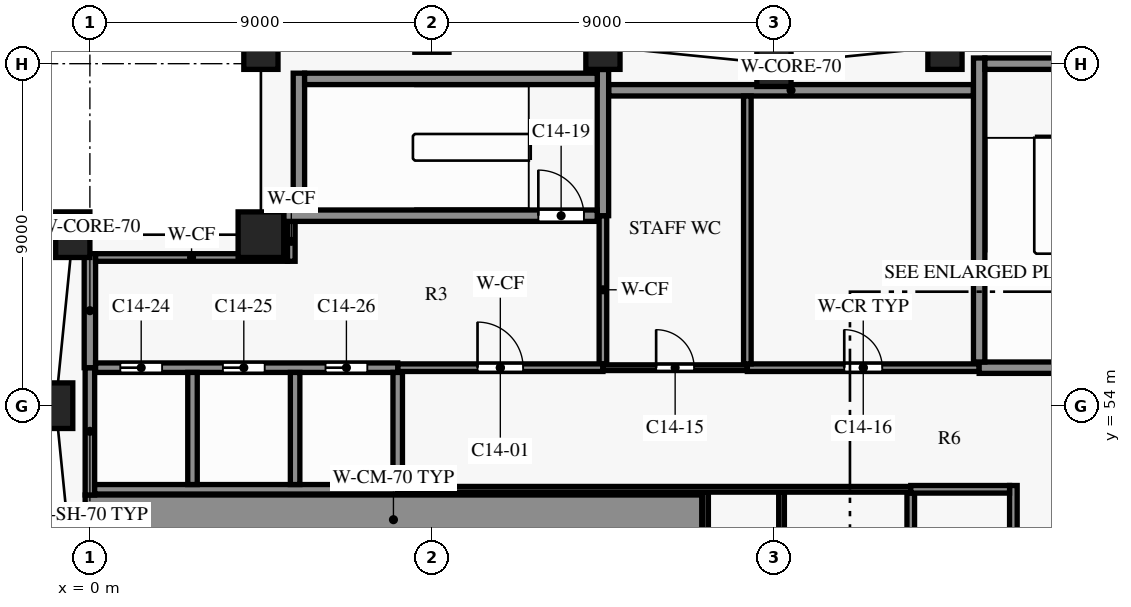
"""IFC4 building model, lengths in metres.
Left out: names, types, materials, properties, quantities, classifications, styles, units other than length and angle.
Written with IfcOpenShell. Run it as: python <this file> out.ifc"""

import sys

from ifc_helpers import new_model, si_unit, direction, frame, frame_2d, origin, origin_2d, place, context, subcontext, project, spatial, rectangle, extrude, element, fill, save


model = new_model("IFC4")
c1 = context("Model", 3, precision=1e-05, world=origin(), true_north=direction((0.0, 1.0)))
c2 = subcontext(c1, "Body", "Model", "MODEL_VIEW")
j1 = project(units=[si_unit("LENGTHUNIT", "METRE"), si_unit("PLANEANGLEUNIT", "RADIAN")], contexts=[c1])
p1 = place(None, origin())
s1 = spatial("IfcSite", under=j1, at=p1, CompositionType="ELEMENT")
p2 = place(p1, origin())
s2 = spatial("IfcBuilding", under=s1, at=p2, CompositionType="ELEMENT")
p3 = place(p2, frame((0.0, 0.0, 96.1)))
s3 = spatial("IfcBuildingStorey", under=s2, at=p3, CompositionType="ELEMENT", Elevation=96.1)
for number, where, z_axis, x_axis in (
    (1, (22.5, 63.45, 0.0), (0.0, 0.0, 1.0), (-0.995, -0.1, 0.0)),
    (2, (18.0, 63.0, 0.0), (0.0, 0.0, 1.0), (-1.0, 0.0, 0.0)),
    (3, (13.5, 63.45, 0.0), (0.0, 0.0, 1.0), (-0.995, 0.1, 0.0)),
    (4, (9.0, 63.9, 0.0), (0.0, 0.0, 1.0), (-1.0, 0.0, 0.0)),
    (5, (4.5, 63.45, 0.0), (0.0, 0.0, 1.0), (-0.995, -0.1, 0.0)),
    (6, (-0.45, 58.5, 0.0), (0.0, 0.0, 1.0), (-0.1, -0.995, 0.0)),
    (7, (-0.9, 54.0, 0.0), (0.0, 0.0, 1.0), (0.0, -1.0, 0.0)),
):
    element("IfcColumn", number, at=place(p3, frame(where, z_axis=z_axis, x_axis=x_axis)), inside=s3, PredefinedType="COLUMN", context=c2, shape_type="SweptSolid", body=[
        extrude(rectangle(XDim=0.9, YDim=1.2, at=origin_2d()), origin(), (0.0, 0.0, 1.0), 3.8),
    ])
p4 = place(p3, frame((4.5, 58.5, 0.0), z_axis=(0.0, 0.0, 1.0), x_axis=(1.0, 0.0, 0.0)))
e8 = element("IfcColumn", 8, at=p4, inside=s3, PredefinedType="COLUMN", context=c2, shape_type="SweptSolid", body=[
    extrude(rectangle(XDim=1.2, YDim=1.2, at=origin_2d()), origin(), (0.0, 0.0, 1.0), 3.8),
])
p5 = place(p3, frame((-0.125, 51.0, 0.0), z_axis=(0.0, 0.0, 1.0), x_axis=(1.0, 0.0, 0.0)))
e9 = element("IfcWall", 9, at=p5, inside=s3, PredefinedType="SHEAR", context=c2, shape_type="SweptSolid", body=[
    extrude(rectangle(XDim=16.225, YDim=1.3, at=frame_2d((8.113, 0.0))), origin(), (0.0, 0.0, 1.0), 3.5),
])
p6 = place(p3, frame((8.1, 51.8, 0.0), z_axis=(0.0, 0.0, 1.0), x_axis=(1.0, 0.0, 0.0)))
e10 = element("IfcWall", 10, at=p6, inside=s3, PredefinedType="PARTITIONING", context=c2, shape_type="SweptSolid", body=[
    extrude(rectangle(XDim=13.5, YDim=0.15, at=frame_2d((6.75, 0.0))), origin(), (0.0, 0.0, 1.0), 3.5),
])
p7 = place(p3, frame((21.6, 51.8, 0.0), z_axis=(0.0, 0.0, 1.0), x_axis=(1.0, 0.0, 0.0)))
e11 = element("IfcWall", 11, at=p7, inside=s3, PredefinedType="PARTITIONING", context=c2, shape_type="SweptSolid", body=[
    extrude(rectangle(XDim=2.6, YDim=0.2, at=frame_2d((1.3, 0.0))), origin(), (0.0, 0.0, 1.0), 3.5),
])
p8 = place(p3, frame((0.125, 51.8, 0.0), z_axis=(0.0, 0.0, 1.0), x_axis=(1.0, 0.0, 0.0)))
e12 = element("IfcWall", 12, at=p8, inside=s3, PredefinedType="SHEAR", context=c2, shape_type="SweptSolid", body=[
    extrude(rectangle(XDim=7.975, YDim=0.25, at=frame_2d((3.988, 0.0))), origin(), (0.0, 0.0, 1.0), 3.5),
])
p9 = place(p3, frame((8.1, 55.0, 0.0), z_axis=(0.0, 0.0, 1.0), x_axis=(1.0, 0.0, 0.0)))
e13 = element("IfcWall", 13, at=p9, inside=s3, PredefinedType="PARTITIONING", context=c2, shape_type="SweptSolid", body=[
    extrude(rectangle(XDim=5.4, YDim=0.2, at=frame_2d((2.7, 0.0))), origin(), (0.0, 0.0, 1.0), 3.5),
])
p10 = place(p9, frame((2.1, 0.0, 0.0)))
e14 = element("IfcOpeningElement", 14, at=p10, cuts=e13, PredefinedType="OPENING", context=c2, shape_type="SweptSolid", body=[
    extrude(rectangle(XDim=1.2, YDim=2.2, at=frame_2d((0.6, 1.1))), frame((0.0, 0.11, 0.0), z_axis=(0.0, -1.0, 0.0), x_axis=(1.0, 0.0, 0.0)), (0.0, 0.0, 1.0), 0.22),
])
p11 = place(p3, frame((13.5, 55.0, 0.0), z_axis=(0.0, 0.0, 1.0), x_axis=(1.0, 0.0, 0.0)))
e15 = element("IfcWall", 15, at=p11, inside=s3, PredefinedType="PARTITIONING", context=c2, shape_type="SweptSolid", body=[
    extrude(rectangle(XDim=3.8, YDim=0.15, at=frame_2d((1.9, 0.0))), origin(), (0.0, 0.0, 1.0), 3.5),
])
p12 = place(p11, frame((1.4, 0.0, 0.0)))
e16 = element("IfcOpeningElement", 16, at=p12, cuts=e15, PredefinedType="OPENING", context=c2, shape_type="SweptSolid", body=[
    extrude(rectangle(XDim=1.0, YDim=2.1, at=frame_2d((0.5, 1.05))), frame((0.0, 0.085, 0.0), z_axis=(0.0, -1.0, 0.0), x_axis=(1.0, 0.0, 0.0)), (0.0, 0.0, 1.0), 0.17),
])
p13 = place(p3, frame((17.3, 55.0, 0.0), z_axis=(0.0, 0.0, 1.0), x_axis=(1.0, 0.0, 0.0)))
e17 = element("IfcWall", 17, at=p13, inside=s3, PredefinedType="PARTITIONING", context=c2, shape_type="SweptSolid", body=[
    extrude(rectangle(XDim=6.1, YDim=0.2, at=frame_2d((3.05, 0.0))), origin(), (0.0, 0.0, 1.0), 3.5),
])
p14 = place(p13, frame((2.55, 0.0, 0.0)))
e18 = element("IfcOpeningElement", 18, at=p14, cuts=e17, PredefinedType="OPENING", context=c2, shape_type="SweptSolid", body=[
    extrude(rectangle(XDim=1.0, YDim=2.1, at=frame_2d((0.5, 1.05))), frame((0.0, 0.11, 0.0), z_axis=(0.0, -1.0, 0.0), x_axis=(1.0, 0.0, 0.0)), (0.0, 0.0, 1.0), 0.22),
])
p15 = place(p3, frame((0.15, 55.0, 0.0), z_axis=(0.0, 0.0, 1.0), x_axis=(1.0, 0.0, 0.0)))
e19 = element("IfcWall", 19, at=p15, inside=s3, PredefinedType="SHEAR", context=c2, shape_type="SweptSolid", body=[
    extrude(rectangle(XDim=7.95, YDim=0.25, at=frame_2d((3.975, 0.0))), origin(), (0.0, 0.0, 1.0), 3.5),
])
p16 = place(p15, frame((0.65, 0.0, 0.0)))
e20 = element("IfcOpeningElement", 20, at=p16, cuts=e19, PredefinedType="OPENING", context=c2, shape_type="SweptSolid", body=[
    extrude(rectangle(XDim=1.1, YDim=2.1, at=frame_2d((0.55, 1.05))), frame((0.0, 0.135, 0.0), z_axis=(0.0, -1.0, 0.0), x_axis=(1.0, 0.0, 0.0)), (0.0, 0.0, 1.0), 0.27),
])
p17 = place(p15, frame((3.35, 0.0, 0.0)))
e21 = element("IfcOpeningElement", 21, at=p17, cuts=e19, PredefinedType="OPENING", context=c2, shape_type="SweptSolid", body=[
    extrude(rectangle(XDim=1.1, YDim=2.1, at=frame_2d((0.55, 1.05))), frame((0.0, 0.135, 0.0), z_axis=(0.0, -1.0, 0.0), x_axis=(1.0, 0.0, 0.0)), (0.0, 0.0, 1.0), 0.27),
])
p18 = place(p15, frame((6.05, 0.0, 0.0)))
e22 = element("IfcOpeningElement", 22, at=p18, cuts=e19, PredefinedType="OPENING", context=c2, shape_type="SweptSolid", body=[
    extrude(rectangle(XDim=1.1, YDim=2.1, at=frame_2d((0.55, 1.05))), frame((0.0, 0.135, 0.0), z_axis=(0.0, -1.0, 0.0), x_axis=(1.0, 0.0, 0.0)), (0.0, 0.0, 1.0), 0.27),
])
p19 = place(p3, frame((23.4, 55.0, 0.0), z_axis=(0.0, 0.0, 1.0), x_axis=(1.0, 0.0, 0.0)))
e23 = element("IfcWall", 23, at=p19, inside=s3, PredefinedType="SHEAR", context=c2, shape_type="SweptSolid", body=[
    extrude(rectangle(XDim=3.45, YDim=0.3, at=frame_2d((1.725, 0.0))), origin(), (0.0, 0.0, 1.0), 3.5),
])
p20 = place(p3, frame((0.15, 57.9, 0.0), z_axis=(0.0, 0.0, 1.0), x_axis=(1.0, 0.0, 0.0)))
e24 = element("IfcWall", 24, at=p20, inside=s3, PredefinedType="PARTITIONING", context=c2, shape_type="SweptSolid", body=[
    extrude(rectangle(XDim=5.05, YDim=0.2, at=frame_2d((2.525, 0.0))), origin(), (0.0, 0.0, 1.0), 3.5),
])
p21 = place(p3, frame((5.1, 59.0, 0.0), z_axis=(0.0, 0.0, 1.0), x_axis=(1.0, 0.0, 0.0)))
e25 = element("IfcWall", 25, at=p21, inside=s3, PredefinedType="SHEAR", context=c2, shape_type="SweptSolid", body=[
    extrude(rectangle(XDim=8.25, YDim=0.3, at=frame_2d((4.125, 0.0))), origin(), (0.0, 0.0, 1.0), 3.5),
])
p22 = place(p21, frame((6.7, 0.0, 0.0)))
e26 = element("IfcOpeningElement", 26, at=p22, cuts=e25, PredefinedType="OPENING", context=c2, shape_type="SweptSolid", body=[
    extrude(rectangle(XDim=1.2, YDim=2.2, at=frame_2d((0.6, 1.1))), frame((0.0, 0.16, 0.0), z_axis=(0.0, -1.0, 0.0), x_axis=(1.0, 0.0, 0.0)), (0.0, 0.0, 1.0), 0.32),
])
p23 = place(p3, frame((13.65, 62.3, 0.0), z_axis=(0.0, 0.0, 1.0), x_axis=(1.0, 0.0, 0.0)))
e27 = element("IfcWall", 27, at=p23, inside=s3, PredefinedType="SHEAR", context=c2, shape_type="SweptSolid", body=[
    extrude(rectangle(XDim=9.6, YDim=0.3, at=frame_2d((4.8, 0.0))), origin(), (0.0, 0.0, 1.0), 3.5),
])
p24 = place(p3, frame((5.65, 62.6, 0.0), z_axis=(0.0, 0.0, 1.0), x_axis=(1.0, 0.0, 0.0)))
e28 = element("IfcWall", 28, at=p24, inside=s3, PredefinedType="SHEAR", context=c2, shape_type="SweptSolid", body=[
    extrude(rectangle(XDim=7.7, YDim=0.3, at=frame_2d((3.85, 0.0))), origin(), (0.0, 0.0, 1.0), 3.5),
])
p25 = place(p3, frame((23.55, 63.0, 0.0), z_axis=(0.0, 0.0, 1.0), x_axis=(1.0, 0.0, 0.0)))
e29 = element("IfcWall", 29, at=p25, inside=s3, PredefinedType="SHEAR", context=c2, shape_type="SweptSolid", body=[
    extrude(rectangle(XDim=3.3, YDim=0.3, at=frame_2d((1.65, 0.0))), origin(), (0.0, 0.0, 1.0), 3.5),
])
p26 = place(p3, frame((0.0, 55.0, 0.0), z_axis=(0.0, 0.0, 1.0), x_axis=(0.0, 1.0, 0.0)))
e30 = element("IfcWall", 30, at=p26, inside=s3, PredefinedType="SHEAR", context=c2, shape_type="SweptSolid", body=[
    extrude(rectangle(XDim=3.0, YDim=0.3, at=frame_2d((1.5, 0.0))), origin(), (0.0, 0.0, 1.0), 3.5),
])
p27 = place(p3, frame((0.0, 51.65, 0.0), z_axis=(0.0, 0.0, 1.0), x_axis=(0.0, 1.0, 0.0)))
e31 = element("IfcWall", 31, at=p27, inside=s3, PredefinedType="SHEAR", context=c2, shape_type="SweptSolid", body=[
    extrude(rectangle(XDim=3.35, YDim=0.25, at=frame_2d((1.675, 0.0))), origin(), (0.0, 0.0, 1.0), 3.5),
])
p28 = place(p3, frame((2.7, 51.925, 0.0), z_axis=(0.0, 0.0, 1.0), x_axis=(0.0, 1.0, 0.0)))
e32 = element("IfcWall", 32, at=p28, inside=s3, PredefinedType="SHEAR", context=c2, shape_type="SweptSolid", body=[
    extrude(rectangle(XDim=2.95, YDim=0.25, at=frame_2d((1.475, 0.0))), origin(), (0.0, 0.0, 1.0), 3.5),
])
p29 = place(p3, frame((5.3, 57.8, 0.0), z_axis=(0.0, 0.0, 1.0), x_axis=(0.0, 1.0, 0.0)))
e33 = element("IfcWall", 33, at=p29, inside=s3, PredefinedType="PARTITIONING", context=c2, shape_type="SweptSolid", body=[
    extrude(rectangle(XDim=1.05, YDim=0.2, at=frame_2d((0.525, 0.0))), origin(), (0.0, 0.0, 1.0), 3.5),
])
p30 = place(p3, frame((5.4, 51.925, 0.0), z_axis=(0.0, 0.0, 1.0), x_axis=(0.0, 1.0, 0.0)))
e34 = element("IfcWall", 34, at=p30, inside=s3, PredefinedType="SHEAR", context=c2, shape_type="SweptSolid", body=[
    extrude(rectangle(XDim=2.95, YDim=0.25, at=frame_2d((1.475, 0.0))), origin(), (0.0, 0.0, 1.0), 3.5),
])
p31 = place(p3, frame((5.5, 59.15, 0.0), z_axis=(0.0, 0.0, 1.0), x_axis=(0.0, 1.0, 0.0)))
e35 = element("IfcWall", 35, at=p31, inside=s3, PredefinedType="SHEAR", context=c2, shape_type="SweptSolid", body=[
    extrude(rectangle(XDim=3.6, YDim=0.3, at=frame_2d((1.8, 0.0))), origin(), (0.0, 0.0, 1.0), 3.5),
])
p32 = place(p3, frame((8.1, 51.925, 0.0), z_axis=(0.0, 0.0, 1.0), x_axis=(0.0, 1.0, 0.0)))
e36 = element("IfcWall", 36, at=p32, inside=s3, PredefinedType="SHEAR", context=c2, shape_type="SweptSolid", body=[
    extrude(rectangle(XDim=2.95, YDim=0.25, at=frame_2d((1.475, 0.0))), origin(), (0.0, 0.0, 1.0), 3.5),
])
p33 = place(p3, frame((13.5, 55.1, 0.0), z_axis=(0.0, 0.0, 1.0), x_axis=(0.0, 1.0, 0.0)))
e37 = element("IfcWall", 37, at=p33, inside=s3, PredefinedType="PARTITIONING", context=c2, shape_type="SweptSolid", body=[
    extrude(rectangle(XDim=3.9, YDim=0.2, at=frame_2d((1.95, 0.0))), origin(), (0.0, 0.0, 1.0), 3.5),
])
p34 = place(p3, frame((13.5, 59.0, 0.0), z_axis=(0.0, 0.0, 1.0), x_axis=(0.0, 1.0, 0.0)))
e38 = element("IfcWall", 38, at=p34, inside=s3, PredefinedType="SHEAR", context=c2, shape_type="SweptSolid", body=[
    extrude(rectangle(XDim=3.847, YDim=0.3, at=frame_2d((1.923, 0.0))), origin(), (0.0, 0.0, 1.0), 3.5),
])
p35 = place(p3, frame((16.2, 50.2, 0.0), z_axis=(0.0, 0.0, 1.0), x_axis=(0.0, 1.0, 0.0)))
e39 = element("IfcWall", 39, at=p35, inside=s3, PredefinedType="PARTITIONING", context=c2, shape_type="SweptSolid", body=[
    extrude(rectangle(XDim=1.525, YDim=0.15, at=frame_2d((0.763, 0.0))), origin(), (0.0, 0.0, 1.0), 3.5),
])
p36 = place(p3, frame((17.3, 55.1, 0.0), z_axis=(0.0, 0.0, 1.0), x_axis=(0.0, 1.0, 0.0)))
e40 = element("IfcWall", 40, at=p36, inside=s3, PredefinedType="PARTITIONING", context=c2, shape_type="SweptSolid", body=[
    extrude(rectangle(XDim=7.05, YDim=0.2, at=frame_2d((3.525, 0.0))), origin(), (0.0, 0.0, 1.0), 3.5),
])
p37 = place(p3, frame((18.2, 47.1, 0.0), z_axis=(0.0, 0.0, 1.0), x_axis=(0.0, 1.0, 0.0)))
e41 = element("IfcWall", 41, at=p37, inside=s3, PredefinedType="PARTITIONING", context=c2, shape_type="SweptSolid", body=[
    extrude(rectangle(XDim=4.625, YDim=0.15, at=frame_2d((2.312, 0.0))), origin(), (0.0, 0.0, 1.0), 3.5),
])
p38 = place(p3, frame((21.6, 47.1, 0.0), z_axis=(0.0, 0.0, 1.0), x_axis=(0.0, 1.0, 0.0)))
e42 = element("IfcWall", 42, at=p38, inside=s3, PredefinedType="PARTITIONING", context=c2, shape_type="SweptSolid", body=[
    extrude(rectangle(XDim=4.6, YDim=0.2, at=frame_2d((2.3, 0.0))), origin(), (0.0, 0.0, 1.0), 3.5),
])
p39 = place(p3, frame((23.4, 55.15, 0.0), z_axis=(0.0, 0.0, 1.0), x_axis=(0.0, 1.0, 0.0)))
e43 = element("IfcWall", 43, at=p39, inside=s3, PredefinedType="SHEAR", context=c2, shape_type="SweptSolid", body=[
    extrude(rectangle(XDim=8.0, YDim=0.3, at=frame_2d((4.0, 0.0))), origin(), (0.0, 0.0, 1.0), 3.5),
])
p40 = place(p3, frame((24.3, 46.9, 0.0), z_axis=(0.0, 0.0, 1.0), x_axis=(0.0, 1.0, 0.0)))
e44 = element("IfcWall", 44, at=p40, inside=s3, PredefinedType="SHEAR", context=c2, shape_type="SweptSolid", body=[
    extrude(rectangle(XDim=5.0, YDim=0.2, at=frame_2d((2.5, 0.0))), origin(), (0.0, 0.0, 1.0), 3.5),
])
p41 = place(p10, origin())
e45 = element("IfcDoor", 45, at=p41, inside=s3, OperationType="SINGLE_SWING_RIGHT", PredefinedType="DOOR", context=c2, shape_type="SweptSolid", body=[
    extrude(rectangle(XDim=1.2, YDim=2.2, at=frame_2d((0.6, 1.1))), frame((0.0, 0.025, 0.0), z_axis=(0.0, -1.0, 0.0), x_axis=(1.0, 0.0, 0.0)), (0.0, 0.0, 1.0), 0.05),
])
fill(e14, e45)
p42 = place(p12, origin())
e46 = element("IfcDoor", 46, at=p42, inside=s3, OperationType="SINGLE_SWING_LEFT", PredefinedType="DOOR", context=c2, shape_type="SweptSolid", body=[
    extrude(rectangle(XDim=1.0, YDim=2.1, at=frame_2d((0.5, 1.05))), frame((0.0, 0.025, 0.0), z_axis=(0.0, -1.0, 0.0), x_axis=(1.0, 0.0, 0.0)), (0.0, 0.0, 1.0), 0.05),
])
fill(e16, e46)
p43 = place(p14, origin())
e47 = element("IfcDoor", 47, at=p43, inside=s3, OperationType="SINGLE_SWING_RIGHT", PredefinedType="DOOR", context=c2, shape_type="SweptSolid", body=[
    extrude(rectangle(XDim=1.0, YDim=2.1, at=frame_2d((0.5, 1.05))), frame((0.0, 0.025, 0.0), z_axis=(0.0, -1.0, 0.0), x_axis=(1.0, 0.0, 0.0)), (0.0, 0.0, 1.0), 0.05),
])
fill(e18, e47)
p44 = place(p22, origin())
e48 = element("IfcDoor", 48, at=p44, inside=s3, OperationType="SINGLE_SWING_RIGHT", PredefinedType="DOOR", context=c2, shape_type="SweptSolid", body=[
    extrude(rectangle(XDim=1.2, YDim=2.2, at=frame_2d((0.6, 1.1))), frame((0.0, 0.025, 0.0), z_axis=(0.0, -1.0, 0.0), x_axis=(1.0, 0.0, 0.0)), (0.0, 0.0, 1.0), 0.05),
])
fill(e26, e48)
p45 = place(p16, origin())
e49 = element("IfcDoor", 49, at=p45, inside=s3, OperationType="DOUBLE_DOOR_SLIDING", PredefinedType="DOOR", context=c2, shape_type="SweptSolid", body=[
    extrude(rectangle(XDim=1.1, YDim=2.1, at=frame_2d((0.55, 1.05))), frame((0.0, 0.025, 0.0), z_axis=(0.0, -1.0, 0.0), x_axis=(1.0, 0.0, 0.0)), (0.0, 0.0, 1.0), 0.05),
])
fill(e20, e49)
p46 = place(p17, origin())
e50 = element("IfcDoor", 50, at=p46, inside=s3, OperationType="DOUBLE_DOOR_SLIDING", PredefinedType="DOOR", context=c2, shape_type="SweptSolid", body=[
    extrude(rectangle(XDim=1.1, YDim=2.1, at=frame_2d((0.55, 1.05))), frame((0.0, 0.025, 0.0), z_axis=(0.0, -1.0, 0.0), x_axis=(1.0, 0.0, 0.0)), (0.0, 0.0, 1.0), 0.05),
])
fill(e21, e50)
p47 = place(p18, origin())
e51 = element("IfcDoor", 51, at=p47, inside=s3, OperationType="DOUBLE_DOOR_SLIDING", PredefinedType="DOOR", context=c2, shape_type="SweptSolid", body=[
    extrude(rectangle(XDim=1.1, YDim=2.1, at=frame_2d((0.55, 1.05))), frame((0.0, 0.025, 0.0), z_axis=(0.0, -1.0, 0.0), x_axis=(1.0, 0.0, 0.0)), (0.0, 0.0, 1.0), 0.05),
])
fill(e22, e51)
save(model, sys.argv[1])
